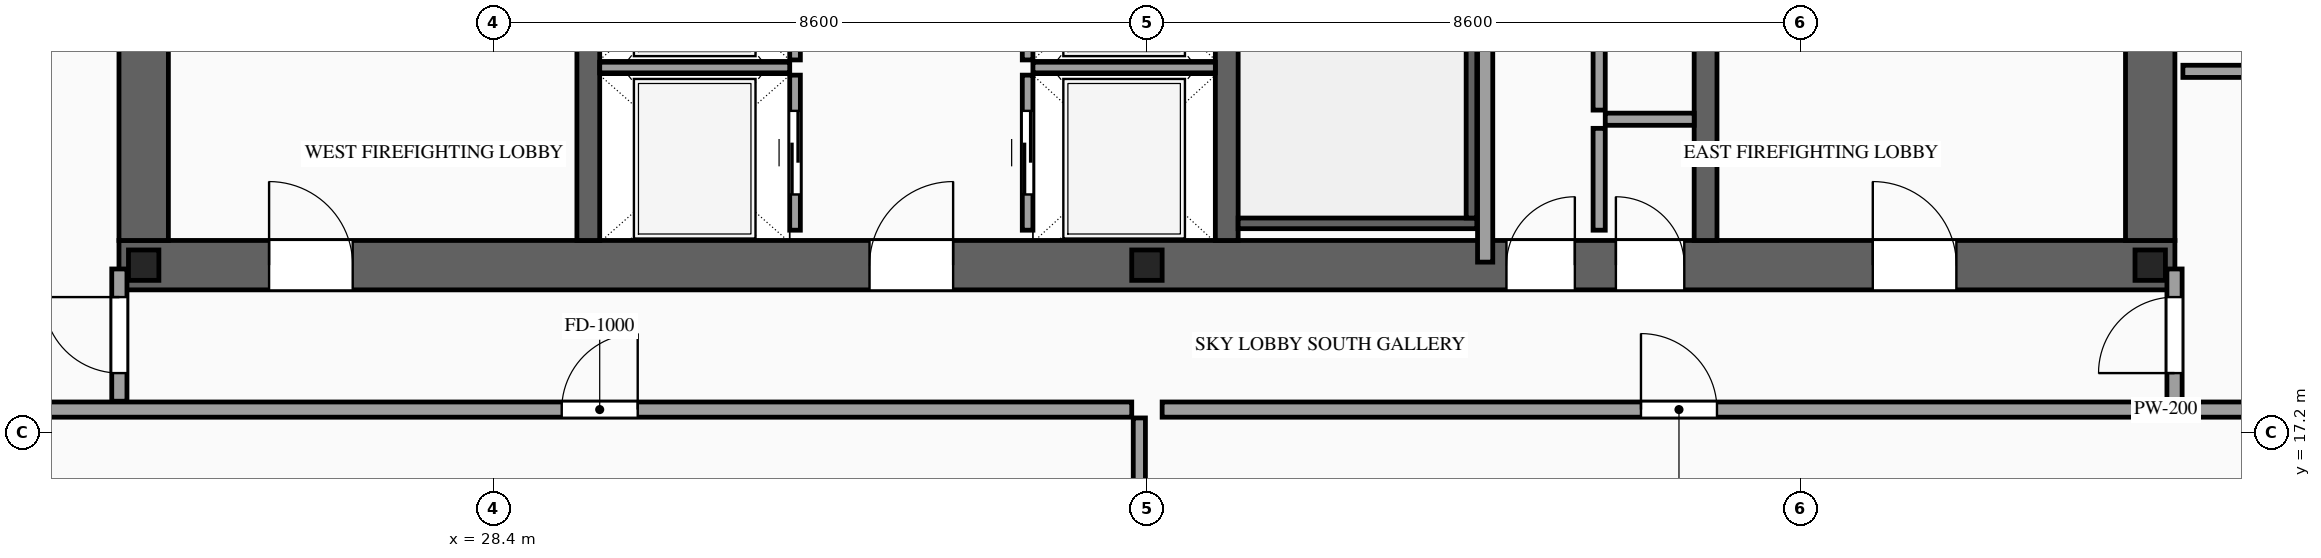
"""IFC4 building model, lengths in metres.
Left out: names, types, materials, properties, quantities, classifications, styles, units other than length and angle.
Written with IfcOpenShell. Run it as: python <this file> out.ifc"""

import sys

from ifc_helpers import new_model, si_unit, direction, frame, frame_2d, origin, origin_2d, place, context, subcontext, project, spatial, rectangle, i_section, extrude, source, transform, mapped, element, fill, save


model = new_model("IFC4")
c1 = context("Model", 3, precision=1e-05, world=origin(), true_north=direction((0.0, 1.0)))
c2 = subcontext(c1, "Body", "Model", "MODEL_VIEW")
j1 = project(units=[si_unit("LENGTHUNIT", "METRE"), si_unit("PLANEANGLEUNIT", "RADIAN")], contexts=[c1])
p1 = place(None, origin())
s1 = spatial("IfcSite", under=j1, at=p1, CompositionType="ELEMENT")
p2 = place(p1, origin())
s2 = spatial("IfcBuilding", under=s1, at=p2, CompositionType="ELEMENT")
p3 = place(p2, frame((0.0, 0.0, 166.8)))
s3 = spatial("IfcBuildingStorey", under=s2, at=p3, CompositionType="ELEMENT", Elevation=166.8)
p4 = place(p3, frame((23.475, 19.4, 0.0), z_axis=(0.0, 0.0, 1.0), x_axis=(1.0, 0.0, 0.0)))
e1 = element("IfcWall", 1, at=p4, inside=s3, PredefinedType="SHEAR", context=c2, shape_type="SweptSolid", body=[
    extrude(rectangle(XDim=27.05, YDim=0.65, at=frame_2d((13.525, 0.0))), origin(), (0.0, 0.0, 1.0), 4.8),
])
p5 = place(p4, frame((1.975, 0.0, 0.0)))
e2 = element("IfcOpeningElement", 2, at=p5, cuts=e1, PredefinedType="OPENING", context=c2, shape_type="SweptSolid", body=[
    extrude(rectangle(XDim=1.1, YDim=2.2, at=frame_2d((0.55, 1.1))), frame((0.0, 0.34, 0.0), z_axis=(0.0, -1.0, 0.0), x_axis=(1.0, 0.0, 0.0)), (0.0, 0.0, 1.0), 0.68),
])
p6 = place(p4, frame((9.875, 0.0, 0.0)))
e3 = element("IfcOpeningElement", 3, at=p6, cuts=e1, PredefinedType="OPENING", context=c2, shape_type="SweptSolid", body=[
    extrude(rectangle(XDim=1.1, YDim=2.2, at=frame_2d((0.55, 1.1))), frame((0.0, 0.34, 0.0), z_axis=(0.0, -1.0, 0.0), x_axis=(1.0, 0.0, 0.0)), (0.0, 0.0, 1.0), 0.68),
])
p7 = place(p4, frame((23.075, 0.0, 0.0)))
e4 = element("IfcOpeningElement", 4, at=p7, cuts=e1, PredefinedType="OPENING", context=c2, shape_type="SweptSolid", body=[
    extrude(rectangle(XDim=1.1, YDim=2.2, at=frame_2d((0.55, 1.1))), frame((0.0, 0.34, 0.0), z_axis=(0.0, -1.0, 0.0), x_axis=(1.0, 0.0, 0.0)), (0.0, 0.0, 1.0), 0.68),
])
p8 = place(p4, frame((19.695, 0.0, 0.0)))
e5 = element("IfcOpeningElement", 5, at=p8, cuts=e1, PredefinedType="OPENING", context=c2, shape_type="SweptSolid", body=[
    extrude(rectangle(XDim=0.9, YDim=2.15, at=frame_2d((0.45, 1.075))), frame((0.0, 0.34, 0.0), z_axis=(0.0, -1.0, 0.0), x_axis=(1.0, 0.0, 0.0)), (0.0, 0.0, 1.0), 0.68),
])
p9 = place(p4, frame((18.255, 0.0, 0.0)))
e6 = element("IfcOpeningElement", 6, at=p9, cuts=e1, PredefinedType="OPENING", context=c2, shape_type="SweptSolid", body=[
    extrude(rectangle(XDim=0.9, YDim=2.15, at=frame_2d((0.45, 1.075))), frame((0.0, 0.34, 0.0), z_axis=(0.0, -1.0, 0.0), x_axis=(1.0, 0.0, 0.0)), (0.0, 0.0, 1.0), 0.68),
])
m1 = source(origin(), c2, "Body", "SweptSolid", [
    extrude(rectangle(XDim=12.15, YDim=0.65, at=frame_2d((6.075, 0.0))), origin(), (0.0, 0.0, 1.0), 4.8),
])
for number, where, z_axis, x_axis in (
    (7, (23.8, 19.725, 0.0), (0.0, 0.0, 1.0), (0.0, 1.0, 0.0)),
    (8, (50.2, 19.725, 0.0), (0.0, 0.0, 1.0), (0.0, 1.0, 0.0)),
):
    element("IfcWall", number, at=place(p3, frame(where, z_axis=z_axis, x_axis=x_axis)), inside=s3, PredefinedType="SHEAR", context=c2, shape_type="MappedRepresentation", body=[
        mapped(m1, transform((0.0, 0.0, 0.0), scale=1.0)),
    ])
m2 = source(origin(), c2, "Body", "SweptSolid", [
    extrude(rectangle(XDim=12.15, YDim=0.3, at=frame_2d((6.075, 0.0))), origin(), (0.0, 0.0, 1.0), 4.8),
])
for number, where, z_axis, x_axis in (
    (9, (29.65, 19.725, 0.0), (0.0, 0.0, 1.0), (0.0, 1.0, 0.0)),
    (10, (38.05, 19.725, 0.0), (0.0, 0.0, 1.0), (0.0, 1.0, 0.0)),
):
    element("IfcWall", number, at=place(p3, frame(where, z_axis=z_axis, x_axis=x_axis)), inside=s3, PredefinedType="SOLIDWALL", context=c2, shape_type="MappedRepresentation", body=[
        mapped(m2, transform((0.0, 0.0, 0.0), scale=1.0)),
    ])
p10 = place(p3, frame((44.35, 19.725, 0.0), z_axis=(0.0, 0.0, 1.0), x_axis=(0.0, 1.0, 0.0)))
e11 = element("IfcWall", 11, at=p10, inside=s3, PredefinedType="SOLIDWALL", context=c2, shape_type="SweptSolid", body=[
    extrude(rectangle(XDim=12.15, YDim=0.3, at=frame_2d((6.075, 0.0))), origin(), (0.0, 0.0, 1.0), 4.8),
])
p11 = place(p10, frame((6.475, 0.0, 0.0)))
e12 = element("IfcOpeningElement", 12, at=p11, cuts=e11, PredefinedType="OPENING", context=c2, shape_type="SweptSolid", body=[
    extrude(rectangle(XDim=1.1, YDim=2.2, at=frame_2d((0.55, 1.1))), frame((0.0, 0.165, 0.0), z_axis=(0.0, -1.0, 0.0), x_axis=(1.0, 0.0, 0.0)), (0.0, 0.0, 1.0), 0.33),
])
p12 = place(p10, frame((8.575, 0.0, 0.0)))
e13 = element("IfcOpeningElement", 13, at=p12, cuts=e11, PredefinedType="OPENING", context=c2, shape_type="SweptSolid", body=[
    extrude(rectangle(XDim=1.1, YDim=2.2, at=frame_2d((0.55, 1.1))), frame((0.0, 0.165, 0.0), z_axis=(0.0, -1.0, 0.0), x_axis=(1.0, 0.0, 0.0)), (0.0, 0.0, 1.0), 0.33),
])
p13 = place(p10, frame((10.675, 0.0, 0.0)))
e14 = element("IfcOpeningElement", 14, at=p13, cuts=e11, PredefinedType="OPENING", context=c2, shape_type="SweptSolid", body=[
    extrude(rectangle(XDim=1.1, YDim=2.2, at=frame_2d((0.55, 1.1))), frame((0.0, 0.165, 0.0), z_axis=(0.0, -1.0, 0.0), x_axis=(1.0, 0.0, 0.0)), (0.0, 0.0, 1.0), 0.33),
])
m3 = source(origin(), c2, "Body", "SweptSolid", [
    extrude(i_section(OverallWidth=0.4, OverallDepth=0.4, WebThickness=0.013, FlangeThickness=0.021, at=origin_2d()), origin(), (0.0, 0.0, 1.0), 4.8),
])
for number, where, z_axis, x_axis in (
    (15, (23.8, 19.4, 0.0), (0.0, 0.0, 1.0), (1.0, 0.0, 0.0)),
    (16, (37.0, 19.4, 0.0), (0.0, 0.0, 1.0), (1.0, 0.0, 0.0)),
    (17, (50.2, 19.4, 0.0), (0.0, 0.0, 1.0), (1.0, 0.0, 0.0)),
):
    element("IfcColumn", number, at=place(p3, frame(where, z_axis=z_axis, x_axis=x_axis)), inside=s3, PredefinedType="COLUMN", context=c2, shape_type="MappedRepresentation", body=[
        mapped(m3, transform((0.0, 0.0, 0.0), scale=1.0)),
    ])
p14 = place(p3, frame((32.37, 19.86, 0.0), z_axis=(0.0, 0.0, 1.0), x_axis=(0.0, 1.0, 0.0)))
e18 = element("IfcWall", 18, at=p14, inside=s3, PredefinedType="SOLIDWALL", context=c2, shape_type="SweptSolid", body=[
    extrude(rectangle(XDim=2.04, YDim=0.14, at=frame_2d((1.02, 0.0))), origin(), (0.0, 0.0, 1.0), 4.5),
])
p15 = place(p14, frame((0.47, 0.0, 0.0)))
e19 = element("IfcOpeningElement", 19, at=p15, cuts=e18, PredefinedType="OPENING", context=c2, shape_type="SweptSolid", body=[
    extrude(rectangle(XDim=1.1, YDim=2.2, at=frame_2d((0.55, 1.1))), frame((0.0, 0.085, 0.0), z_axis=(0.0, -1.0, 0.0), x_axis=(1.0, 0.0, 0.0)), (0.0, 0.0, 1.0), 0.17),
])
m4 = source(origin(), c2, "Body", "SweptSolid", [
    extrude(rectangle(XDim=2.5, YDim=0.14, at=frame_2d((1.25, 0.0))), origin(), (0.0, 0.0, 1.0), 4.5),
])
p16 = place(p3, frame((29.8, 22.0, 0.0), z_axis=(0.0, 0.0, 1.0), x_axis=(1.0, 0.0, 0.0)))
e20 = element("IfcWall", 20, at=p16, inside=s3, PredefinedType="SOLIDWALL", context=c2, shape_type="MappedRepresentation", body=[
    mapped(m4, transform((0.0, 0.0, 0.0), scale=1.0)),
])
p17 = place(p3, frame((32.37, 22.1, 0.0), z_axis=(0.0, 0.0, 1.0), x_axis=(0.0, 1.0, 0.0)))
e21 = element("IfcWall", 21, at=p17, inside=s3, PredefinedType="SOLIDWALL", context=c2, shape_type="SweptSolid", body=[
    extrude(rectangle(XDim=2.2, YDim=0.14, at=frame_2d((1.1, 0.0))), origin(), (0.0, 0.0, 1.0), 4.5),
])
p18 = place(p17, frame((0.55, 0.0, 0.0)))
e22 = element("IfcOpeningElement", 22, at=p18, cuts=e21, PredefinedType="OPENING", context=c2, shape_type="SweptSolid", body=[
    extrude(rectangle(XDim=1.1, YDim=2.2, at=frame_2d((0.55, 1.1))), frame((0.0, 0.085, 0.0), z_axis=(0.0, -1.0, 0.0), x_axis=(1.0, 0.0, 0.0)), (0.0, 0.0, 1.0), 0.17),
])
p19 = place(p3, frame((35.43, 19.86, 0.0), z_axis=(0.0, 0.0, 1.0), x_axis=(0.0, 1.0, 0.0)))
e23 = element("IfcWall", 23, at=p19, inside=s3, PredefinedType="SOLIDWALL", context=c2, shape_type="SweptSolid", body=[
    extrude(rectangle(XDim=2.04, YDim=0.14, at=frame_2d((1.02, 0.0))), origin(), (0.0, 0.0, 1.0), 4.5),
])
p20 = place(p19, frame((0.47, 0.0, 0.0)))
e24 = element("IfcOpeningElement", 24, at=p20, cuts=e23, PredefinedType="OPENING", context=c2, shape_type="SweptSolid", body=[
    extrude(rectangle(XDim=1.1, YDim=2.2, at=frame_2d((0.55, 1.1))), frame((0.0, 0.085, 0.0), z_axis=(0.0, -1.0, 0.0), x_axis=(1.0, 0.0, 0.0)), (0.0, 0.0, 1.0), 0.17),
])
m5 = source(origin(), c2, "Body", "SweptSolid", [
    extrude(rectangle(XDim=2.4, YDim=0.14, at=frame_2d((1.2, 0.0))), origin(), (0.0, 0.0, 1.0), 4.5),
])
p21 = place(p3, frame((35.5, 22.0, 0.0), z_axis=(0.0, 0.0, 1.0), x_axis=(1.0, 0.0, 0.0)))
e25 = element("IfcWall", 25, at=p21, inside=s3, PredefinedType="SOLIDWALL", context=c2, shape_type="MappedRepresentation", body=[
    mapped(m5, transform((0.0, 0.0, 0.0), scale=1.0)),
])
p22 = place(p3, frame((35.43, 22.1, 0.0), z_axis=(0.0, 0.0, 1.0), x_axis=(0.0, 1.0, 0.0)))
e26 = element("IfcWall", 26, at=p22, inside=s3, PredefinedType="SOLIDWALL", context=c2, shape_type="SweptSolid", body=[
    extrude(rectangle(XDim=2.2, YDim=0.14, at=frame_2d((1.1, 0.0))), origin(), (0.0, 0.0, 1.0), 4.5),
])
p23 = place(p22, frame((0.55, 0.0, 0.0)))
e27 = element("IfcOpeningElement", 27, at=p23, cuts=e26, PredefinedType="OPENING", context=c2, shape_type="SweptSolid", body=[
    extrude(rectangle(XDim=1.1, YDim=2.2, at=frame_2d((0.55, 1.1))), frame((0.0, 0.085, 0.0), z_axis=(0.0, -1.0, 0.0), x_axis=(1.0, 0.0, 0.0)), (0.0, 0.0, 1.0), 0.17),
])
m6 = source(origin(), c2, "Body", "SweptSolid", [
    extrude(rectangle(XDim=3.14, YDim=0.14, at=frame_2d((1.57, 0.0))), origin(), (0.0, 0.0, 1.0), 4.5),
])
p24 = place(p3, frame((38.2, 19.95, 0.0), z_axis=(0.0, 0.0, 1.0), x_axis=(1.0, 0.0, 0.0)))
e28 = element("IfcWall", 28, at=p24, inside=s3, PredefinedType="SOLIDWALL", context=c2, shape_type="MappedRepresentation", body=[
    mapped(m6, transform((0.0, 0.0, 0.0), scale=1.0)),
])
m7 = source(origin(), c2, "Body", "SweptSolid", [
    extrude(rectangle(XDim=8.94, YDim=0.14, at=frame_2d((4.47, 0.0))), origin(), (0.0, 0.0, 1.0), 4.5),
])
p25 = place(p3, frame((41.27, 20.02, 0.0), z_axis=(0.0, 0.0, 1.0), x_axis=(0.0, 1.0, 0.0)))
e29 = element("IfcWall", 29, at=p25, inside=s3, PredefinedType="SOLIDWALL", context=c2, shape_type="MappedRepresentation", body=[
    mapped(m7, transform((0.0, 0.0, 0.0), scale=1.0)),
])
m8 = source(origin(), c2, "Body", "SweptSolid", [
    extrude(rectangle(XDim=1.34, YDim=0.16, at=frame_2d((0.67, 0.0))), origin(), (0.0, 0.0, 1.0), 4.5),
])
p26 = place(p3, frame((42.95, 19.86, 0.0), z_axis=(0.0, 0.0, 1.0), x_axis=(0.0, 1.0, 0.0)))
e30 = element("IfcWall", 30, at=p26, inside=s3, PredefinedType="PARTITIONING", context=c2, shape_type="MappedRepresentation", body=[
    mapped(m8, transform((0.0, 0.0, 0.0), scale=1.0)),
])
m9 = source(origin(), c2, "Body", "SweptSolid", [
    extrude(rectangle(XDim=1.17, YDim=0.16, at=frame_2d((0.585, 0.0))), origin(), (0.0, 0.0, 1.0), 4.5),
])
p27 = place(p3, frame((43.03, 21.32, 0.0), z_axis=(0.0, 0.0, 1.0), x_axis=(1.0, 0.0, 0.0)))
e31 = element("IfcWall", 31, at=p27, inside=s3, PredefinedType="PARTITIONING", context=c2, shape_type="MappedRepresentation", body=[
    mapped(m9, transform((0.0, 0.0, 0.0), scale=1.0)),
])
m10 = source(origin(), c2, "Body", "SweptSolid", [
    extrude(rectangle(XDim=6.06, YDim=0.2, at=frame_2d((3.03, 0.0))), origin(), (0.0, 0.0, 1.0), 4.5),
])
p28 = place(p3, frame((41.45, 19.44, 0.0), z_axis=(0.0, 0.0, 1.0), x_axis=(0.0, 1.0, 0.0)))
e32 = element("IfcWall", 32, at=p28, inside=s3, PredefinedType="PARTITIONING", context=c2, shape_type="MappedRepresentation", body=[
    mapped(m10, transform((0.0, 0.0, 0.0), scale=1.0)),
])
m11 = source(origin(), c2, "Body", "SweptSolid", [
    extrude(rectangle(XDim=4.06, YDim=0.16, at=frame_2d((2.03, 0.0))), origin(), (0.0, 0.0, 1.0), 4.5),
])
p29 = place(p3, frame((42.95, 21.44, 0.0), z_axis=(0.0, 0.0, 1.0), x_axis=(0.0, 1.0, 0.0)))
e33 = element("IfcWall", 33, at=p29, inside=s3, PredefinedType="PARTITIONING", context=c2, shape_type="MappedRepresentation", body=[
    mapped(m11, transform((0.0, 0.0, 0.0), scale=1.0)),
])
p30 = place(p3, frame((17.94, 17.5, 0.0), z_axis=(0.0, 0.0, 1.0), x_axis=(1.0, 0.0, 0.0)))
e34 = element("IfcWall", 34, at=p30, inside=s3, PredefinedType="PARTITIONING", context=c2, shape_type="SweptSolid", body=[
    extrude(rectangle(XDim=18.86, YDim=0.2, at=frame_2d((9.43, 0.0))), origin(), (0.0, 0.0, 1.0), 4.5),
])
p31 = place(p30, frame((11.36, 0.0, 0.0)))
e35 = element("IfcOpeningElement", 35, at=p31, cuts=e34, PredefinedType="OPENING", context=c2, shape_type="SweptSolid", body=[
    extrude(rectangle(XDim=1.0, YDim=2.2, at=frame_2d((0.5, 1.1))), frame((0.0, 0.115, 0.0), z_axis=(0.0, -1.0, 0.0), x_axis=(1.0, 0.0, 0.0)), (0.0, 0.0, 1.0), 0.23),
])
m12 = source(origin(), c2, "Body", "SweptSolid", [
    extrude(rectangle(XDim=13.54, YDim=0.16, at=frame_2d((6.77, 0.0))), origin(), (0.0, 0.0, 1.0), 3.907),
])
p32 = place(p3, frame((36.9, 3.85, 0.0), z_axis=(0.0, 0.0, 1.0), x_axis=(0.0, 1.0, 0.0)))
e36 = element("IfcWall", 36, at=p32, inside=s3, PredefinedType="PARTITIONING", context=c2, shape_type="MappedRepresentation", body=[
    mapped(m12, transform((0.0, 0.0, 0.0), scale=1.0)),
])
p33 = place(p3, frame((37.2, 17.5, 0.0), z_axis=(0.0, 0.0, 1.0), x_axis=(1.0, 0.0, 0.0)))
e37 = element("IfcWall", 37, at=p33, inside=s3, PredefinedType="PARTITIONING", context=c2, shape_type="SweptSolid", body=[
    extrude(rectangle(XDim=18.86, YDim=0.2, at=frame_2d((9.43, 0.0))), origin(), (0.0, 0.0, 1.0), 4.5),
])
p34 = place(p33, frame((6.3, 0.0, 0.0)))
e38 = element("IfcOpeningElement", 38, at=p34, cuts=e37, PredefinedType="OPENING", context=c2, shape_type="SweptSolid", body=[
    extrude(rectangle(XDim=1.0, YDim=2.2, at=frame_2d((0.5, 1.1))), frame((0.0, 0.115, 0.0), z_axis=(0.0, -1.0, 0.0), x_axis=(1.0, 0.0, 0.0)), (0.0, 0.0, 1.0), 0.23),
])
p35 = place(p3, frame((23.48, 17.61, 0.0), z_axis=(0.0, 0.0, 1.0), x_axis=(0.0, 1.0, 0.0)))
e39 = element("IfcWall", 39, at=p35, inside=s3, PredefinedType="PARTITIONING", context=c2, shape_type="SweptSolid", body=[
    extrude(rectangle(XDim=1.74, YDim=0.2, at=frame_2d((0.87, 0.0))), origin(), (0.0, 0.0, 1.0), 4.5),
])
p36 = place(p35, frame((0.37, 0.0, 0.0)))
e40 = element("IfcOpeningElement", 40, at=p36, cuts=e39, PredefinedType="OPENING", context=c2, shape_type="SweptSolid", body=[
    extrude(rectangle(XDim=1.0, YDim=2.2, at=frame_2d((0.5, 1.1))), frame((0.0, 0.115, 0.0), z_axis=(0.0, -1.0, 0.0), x_axis=(1.0, 0.0, 0.0)), (0.0, 0.0, 1.0), 0.23),
])
p37 = place(p3, frame((50.52, 17.61, 0.0), z_axis=(0.0, 0.0, 1.0), x_axis=(0.0, 1.0, 0.0)))
e41 = element("IfcWall", 41, at=p37, inside=s3, PredefinedType="PARTITIONING", context=c2, shape_type="SweptSolid", body=[
    extrude(rectangle(XDim=1.74, YDim=0.2, at=frame_2d((0.87, 0.0))), origin(), (0.0, 0.0, 1.0), 4.5),
])
p38 = place(p37, frame((0.37, 0.0, 0.0)))
e42 = element("IfcOpeningElement", 42, at=p38, cuts=e41, PredefinedType="OPENING", context=c2, shape_type="SweptSolid", body=[
    extrude(rectangle(XDim=1.0, YDim=2.2, at=frame_2d((0.5, 1.1))), frame((0.0, 0.115, 0.0), z_axis=(0.0, -1.0, 0.0), x_axis=(1.0, 0.0, 0.0)), (0.0, 0.0, 1.0), 0.23),
])
m13 = source(origin(), c2, "Body", "SweptSolid", [
    extrude(rectangle(XDim=8.32, YDim=0.16, at=frame_2d((4.16, 0.0))), origin(), (0.0, 0.0, 1.0), 4.5),
])
p39 = place(p3, frame((50.63, 21.95, 0.0), z_axis=(0.0, 0.0, 1.0), x_axis=(1.0, 0.0, 0.0)))
e43 = element("IfcWall", 43, at=p39, inside=s3, PredefinedType="PARTITIONING", context=c2, shape_type="MappedRepresentation", body=[
    mapped(m13, transform((0.0, 0.0, 0.0), scale=1.0)),
])
m14 = source(origin(), c2, "Body", "SweptSolid", [
    extrude(rectangle(XDim=1.1, YDim=2.2, at=frame_2d((0.55, 1.1))), frame((0.0, 0.025, 0.0), z_axis=(0.0, -1.0, 0.0), x_axis=(1.0, 0.0, 0.0)), (0.0, 0.0, 1.0), 0.05),
])
p40 = place(p15, origin())
e44 = element("IfcDoor", 44, at=p40, inside=s3, OperationType="SLIDING_TO_LEFT", PredefinedType="DOOR", context=c2, shape_type="MappedRepresentation", body=[
    mapped(m14, transform((0.0, 0.0, 0.0), scale=1.0)),
])
fill(e19, e44)
p41 = place(p20, origin())
e45 = element("IfcDoor", 45, at=p41, inside=s3, OperationType="SLIDING_TO_RIGHT", PredefinedType="DOOR", context=c2, shape_type="MappedRepresentation", body=[
    mapped(m14, transform((0.0, 0.0, 0.0), scale=1.0)),
])
fill(e24, e45)
m15 = source(origin(), c2, "Body", "SweptSolid", [
    extrude(rectangle(XDim=1.1, YDim=2.2, at=frame_2d((0.55, 1.1))), frame((0.0, 0.025, 0.0), z_axis=(0.0, -1.0, 0.0), x_axis=(1.0, 0.0, 0.0)), (0.0, 0.0, 1.0), 0.05),
])
p42 = place(p5, origin())
e46 = element("IfcDoor", 46, at=p42, inside=s3, OperationType="SINGLE_SWING_LEFT", PredefinedType="DOOR", context=c2, shape_type="MappedRepresentation", body=[
    mapped(m15, transform((0.0, 0.0, 0.0), scale=1.0)),
])
fill(e2, e46)
p43 = place(p6, origin())
e47 = element("IfcDoor", 47, at=p43, inside=s3, OperationType="SINGLE_SWING_RIGHT", PredefinedType="DOOR", context=c2, shape_type="MappedRepresentation", body=[
    mapped(m15, transform((0.0, 0.0, 0.0), scale=1.0)),
])
fill(e3, e47)
p44 = place(p7, origin())
e48 = element("IfcDoor", 48, at=p44, inside=s3, OperationType="SINGLE_SWING_LEFT", PredefinedType="DOOR", context=c2, shape_type="MappedRepresentation", body=[
    mapped(m15, transform((0.0, 0.0, 0.0), scale=1.0)),
])
fill(e4, e48)
m16 = source(origin(), c2, "Body", "SweptSolid", [
    extrude(rectangle(XDim=0.9, YDim=2.15, at=frame_2d((0.45, 1.075))), frame((0.0, 0.025, 0.0), z_axis=(0.0, -1.0, 0.0), x_axis=(1.0, 0.0, 0.0)), (0.0, 0.0, 1.0), 0.05),
])
p45 = place(p8, origin())
e49 = element("IfcDoor", 49, at=p45, inside=s3, OperationType="SINGLE_SWING_LEFT", PredefinedType="DOOR", context=c2, shape_type="MappedRepresentation", body=[
    mapped(m16, transform((0.0, 0.0, 0.0), scale=1.0)),
])
fill(e5, e49)
p46 = place(p9, origin())
e50 = element("IfcDoor", 50, at=p46, inside=s3, OperationType="SINGLE_SWING_RIGHT", PredefinedType="DOOR", context=c2, shape_type="MappedRepresentation", body=[
    mapped(m16, transform((0.0, 0.0, 0.0), scale=1.0)),
])
fill(e6, e50)
m17 = source(origin(), c2, "Body", "SweptSolid", [
    extrude(rectangle(XDim=1.0, YDim=2.2, at=frame_2d((0.5, 1.1))), frame((0.0, 0.025, 0.0), z_axis=(0.0, -1.0, 0.0), x_axis=(1.0, 0.0, 0.0)), (0.0, 0.0, 1.0), 0.05),
])
p47 = place(p31, origin())
e51 = element("IfcDoor", 51, at=p47, inside=s3, OperationType="SINGLE_SWING_RIGHT", PredefinedType="DOOR", context=c2, shape_type="MappedRepresentation", body=[
    mapped(m17, transform((0.0, 0.0, 0.0), scale=1.0)),
])
fill(e35, e51)
p48 = place(p34, origin())
e52 = element("IfcDoor", 52, at=p48, inside=s3, OperationType="SINGLE_SWING_LEFT", PredefinedType="DOOR", context=c2, shape_type="MappedRepresentation", body=[
    mapped(m17, transform((0.0, 0.0, 0.0), scale=1.0)),
])
fill(e38, e52)
p49 = place(p36, origin())
e53 = element("IfcDoor", 53, at=p49, inside=s3, OperationType="SINGLE_SWING_RIGHT", PredefinedType="DOOR", context=c2, shape_type="MappedRepresentation", body=[
    mapped(m17, transform((0.0, 0.0, 0.0), scale=1.0)),
])
fill(e40, e53)
p50 = place(p38, origin())
e54 = element("IfcDoor", 54, at=p50, inside=s3, OperationType="SINGLE_SWING_LEFT", PredefinedType="DOOR", context=c2, shape_type="MappedRepresentation", body=[
    mapped(m17, transform((0.0, 0.0, 0.0), scale=1.0)),
])
fill(e42, e54)
save(model, sys.argv[1])
